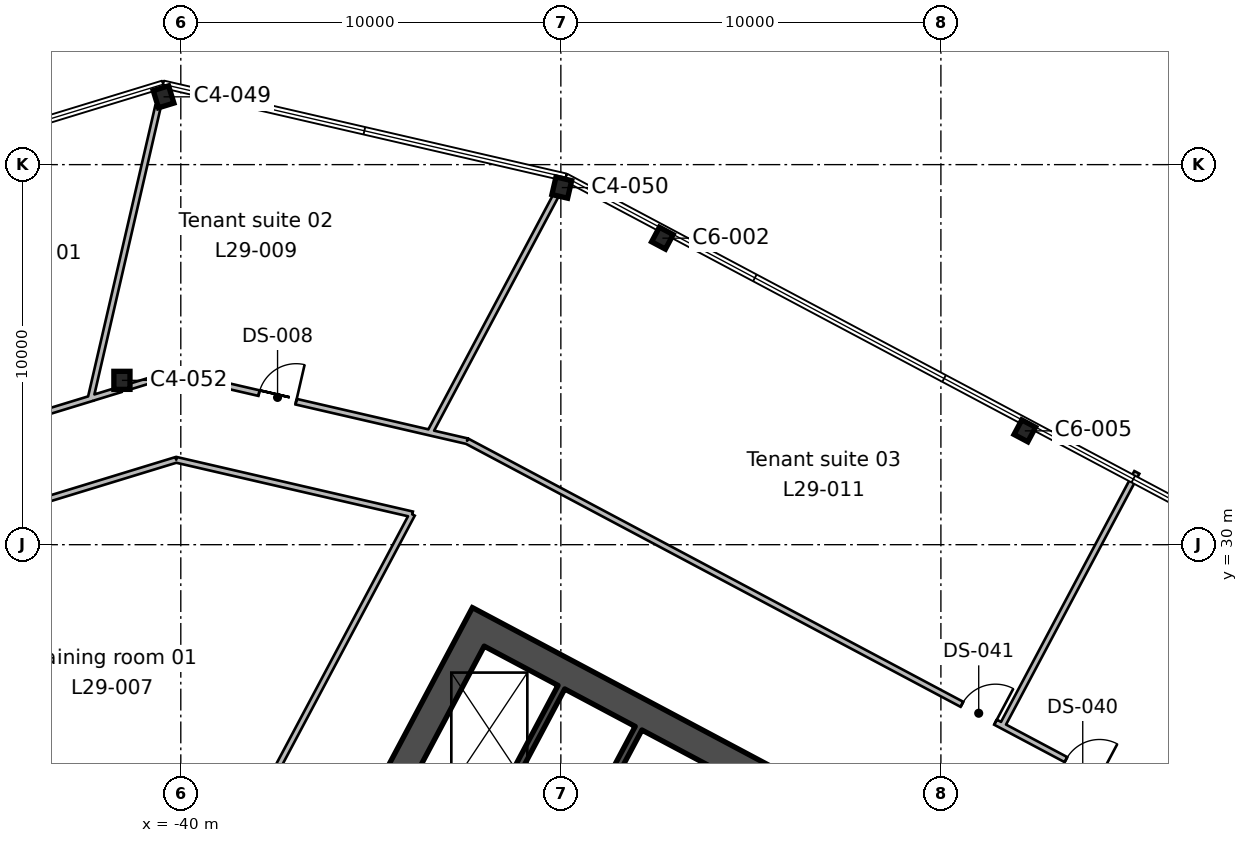
"""IFC4 building model, lengths in metres.
Left out: names, types, materials, properties, quantities, classifications, styles, units other than length and angle.
Written with IfcOpenShell. Run it as: python <this file> out.ifc"""

import sys

from ifc_helpers import new_model, si_unit, direction, frame, frame_2d, origin, origin_2d, place, context, subcontext, project, spatial, rectangle, i_section, extrude, element, fill, save


model = new_model("IFC4")
c1 = context("Model", 3, precision=1e-05, world=origin(), true_north=direction((0.0, 1.0)))
c2 = subcontext(c1, "Body", "Model", "MODEL_VIEW")
j1 = project(units=[si_unit("LENGTHUNIT", "METRE"), si_unit("PLANEANGLEUNIT", "RADIAN")], contexts=[c1])
p1 = place(None, origin())
s1 = spatial("IfcSite", under=j1, at=p1, CompositionType="ELEMENT")
p2 = place(p1, origin())
s2 = spatial("IfcBuilding", under=s1, at=p2, CompositionType="ELEMENT")
p3 = place(p2, frame((0.0, 0.0, 142.2)))
s3 = spatial("IfcBuildingStorey", under=s2, at=p3, CompositionType="ELEMENT", Elevation=142.2)
p4 = place(p3, frame((-17.792, 32.995, 0.0), z_axis=(0.0, 0.0, 1.0), x_axis=(-0.882947592859, 0.469471562786, 0.0)))
e1 = element("IfcColumn", 1, at=p4, inside=s3, PredefinedType="COLUMN", context=c2, shape_type="SweptSolid", body=[
    extrude(i_section(OverallWidth=0.412, OverallDepth=0.434, WebThickness=0.036, FlangeThickness=0.057, FilletRadius=0.015, at=origin_2d()), origin(), (0.0, 0.0, 1.0), 4.0),
])
p5 = place(p3, frame((-41.549, 34.324, 0.0), z_axis=(0.0, 0.0, 1.0), x_axis=(1.0, 0.0, 0.0)))
e2 = element("IfcColumn", 2, at=p5, inside=s3, PredefinedType="COLUMN", context=c2, shape_type="SweptSolid", body=[
    extrude(i_section(OverallWidth=0.424, OverallDepth=0.475, WebThickness=0.048, FlangeThickness=0.077, FilletRadius=0.015, at=origin_2d()), origin(), (0.0, 0.0, 1.0), 4.0),
])
p6 = place(p3, frame((-27.328, 38.065, 0.0), z_axis=(0.0, 0.0, 1.0), x_axis=(-0.882947592859, 0.469471562786, 0.0)))
e3 = element("IfcColumn", 3, at=p6, inside=s3, PredefinedType="COLUMN", context=c2, shape_type="SweptSolid", body=[
    extrude(i_section(OverallWidth=0.412, OverallDepth=0.434, WebThickness=0.036, FlangeThickness=0.057, FilletRadius=0.015, at=origin_2d()), origin(), (0.0, 0.0, 1.0), 4.0),
])
for number, where, z_axis, x_axis in (
    (4, (-29.975, 39.396, 0.0), (0.0, 0.0, 1.0), (-0.974, 0.225, 0.0)),
    (5, (-40.454, 41.784, 0.0), (0.0, 0.0, 1.0), (-0.956, -0.292, 0.0)),
):
    element("IfcColumn", number, at=place(p3, frame(where, z_axis=z_axis, x_axis=x_axis)), inside=s3, PredefinedType="COLUMN", context=c2, shape_type="SweptSolid", body=[
        extrude(i_section(OverallWidth=0.424, OverallDepth=0.475, WebThickness=0.048, FlangeThickness=0.077, FilletRadius=0.015, at=origin_2d()), origin(), (0.0, 0.0, 1.0), 4.0),
    ])
p7 = place(p3, frame((-31.996, 28.168, 0.0), z_axis=(0.0, 0.0, 1.0), x_axis=(-0.469479580143, -0.882943329908, 0.0)))
e6 = element("IfcWall", 6, at=p7, inside=s3, PredefinedType="SHEAR", context=c2, shape_type="SweptSolid", body=[
    extrude(rectangle(XDim=19.7, YDim=0.75, at=frame_2d((9.85, 0.0))), origin(), (0.0, 0.0, 1.0), 4.0),
])
p8 = place(p7, frame((10.45, 0.0, 0.0)))
e7 = element("IfcOpeningElement", 7, at=p8, cuts=e6, PredefinedType="OPENING", context=c2, shape_type="SweptSolid", body=[
    extrude(rectangle(XDim=2.4, YDim=2.4, at=frame_2d((1.2, 1.2))), frame((0.0, 0.385, 0.0), z_axis=(0.0, -1.0, 0.0), x_axis=(1.0, 0.0, 0.0)), (0.0, 0.0, 1.0), 0.77),
])
p9 = place(p3, frame((-14.005, 18.178, 0.0), z_axis=(0.0, 0.0, 1.0), x_axis=(-0.88295010195, 0.469466843842, 0.0)))
e8 = element("IfcWall", 8, at=p9, inside=s3, PredefinedType="SHEAR", context=c2, shape_type="SweptSolid", body=[
    extrude(rectangle(XDim=20.2, YDim=0.75, at=frame_2d((10.1, 0.0))), origin(), (0.0, 0.0, 1.0), 4.0),
])
p10 = place(p3, frame((-27.955, 25.171, 0.0), z_axis=(0.0, 0.0, 1.0), x_axis=(-0.469480409012, -0.88294288918, 0.0)))
e9 = element("IfcWall", 9, at=p10, inside=s3, PredefinedType="SHEAR", context=c2, shape_type="SweptSolid", body=[
    extrude(rectangle(XDim=7.3, YDim=0.2, at=frame_2d((3.65, 0.0))), origin(), (0.0, 0.0, 1.0), 4.0),
])
p11 = place(p3, frame((-29.986, 26.25, 0.0), z_axis=(0.0, 0.0, 1.0), x_axis=(-0.469494272526, -0.882935517501, 0.0)))
e10 = element("IfcWall", 10, at=p11, inside=s3, PredefinedType="SHEAR", context=c2, shape_type="SweptSolid", body=[
    extrude(rectangle(XDim=3.65, YDim=0.2, at=frame_2d((1.825, 0.0))), origin(), (0.0, 0.0, 1.0), 4.0),
])
p12 = place(p3, frame((-42.326, 33.858, 0.0), z_axis=(0.0, 0.0, 1.0), x_axis=(-0.956351168554, -0.292219852858, 0.0)))
e11 = element("IfcWall", 11, at=p12, inside=s3, PredefinedType="PARTITIONING", context=c2, shape_type="SweptSolid", body=[
    extrude(rectangle(XDim=4.709, YDim=0.15, at=frame_2d((2.354, 0.0))), origin(), (0.0, 0.0, 1.0), 3.64),
])
p13 = place(p12, frame((2.025, 0.0, 0.0)))
e12 = element("IfcOpeningElement", 12, at=p13, cuts=e11, PredefinedType="OPENING", context=c2, shape_type="SweptSolid", body=[
    extrude(rectangle(XDim=1.0, YDim=2.1, at=frame_2d((0.5, 1.05))), frame((0.0, 0.085, 0.0), z_axis=(0.0, -1.0, 0.0), x_axis=(1.0, 0.0, 0.0)), (0.0, 0.0, 1.0), 0.17),
])
p14 = place(p3, frame((-45.622, 30.551, 0.0), z_axis=(0.0, 0.0, 1.0), x_axis=(0.956315986812, 0.292334967747, 0.0)))
e13 = element("IfcWall", 13, at=p14, inside=s3, PredefinedType="PARTITIONING", context=c2, shape_type="SweptSolid", body=[
    extrude(rectangle(XDim=5.753, YDim=0.15, at=frame_2d((2.876, 0.0))), origin(), (0.0, 0.0, 1.0), 3.64),
])
p15 = place(p3, frame((-40.12, 32.233, 0.0), z_axis=(0.0, 0.0, 1.0), x_axis=(0.97436665742, -0.224965812754, 0.0)))
e14 = element("IfcWall", 14, at=p15, inside=s3, PredefinedType="PARTITIONING", context=c2, shape_type="SweptSolid", body=[
    extrude(rectangle(XDim=6.374, YDim=0.15, at=frame_2d((3.187, 0.0))), origin(), (0.0, 0.0, 1.0), 3.64),
])
p16 = place(p3, frame((-33.91, 30.799, 0.0), z_axis=(0.0, 0.0, 1.0), x_axis=(-0.469481348016, -0.88294238989, 0.0)))
e15 = element("IfcWall", 15, at=p16, inside=s3, PredefinedType="PARTITIONING", context=c2, shape_type="SweptSolid", body=[
    extrude(rectangle(XDim=22.549, YDim=0.15, at=frame_2d((11.274, 0.0))), origin(), (0.0, 0.0, 1.0), 3.64),
])
p17 = place(p3, frame((-40.599, 41.534, 0.0), z_axis=(0.0, 0.0, 1.0), x_axis=(-0.225013130649, -0.974355731258, 0.0)))
e16 = element("IfcWall", 16, at=p17, inside=s3, PredefinedType="PARTITIONING", context=c2, shape_type="SweptSolid", body=[
    extrude(rectangle(XDim=7.892, YDim=0.15, at=frame_2d((3.946, 0.0))), origin(), (0.0, 0.0, 1.0), 3.64),
])
p18 = place(p3, frame((-34.677, 33.234, 0.0), z_axis=(0.0, 0.0, 1.0), x_axis=(-0.974367234575, 0.224963312978, 0.0)))
e17 = element("IfcWall", 17, at=p18, inside=s3, PredefinedType="PARTITIONING", context=c2, shape_type="SweptSolid", body=[
    extrude(rectangle(XDim=5.668, YDim=0.15, at=frame_2d((2.834, 0.0))), origin(), (0.0, 0.0, 1.0), 3.64),
])
p19 = place(p18, frame((2.35, 0.0, 0.0)))
e18 = element("IfcOpeningElement", 18, at=p19, cuts=e17, PredefinedType="OPENING", context=c2, shape_type="SweptSolid", body=[
    extrude(rectangle(XDim=1.0, YDim=2.1, at=frame_2d((0.5, 1.05))), frame((0.0, 0.085, 0.0), z_axis=(0.0, -1.0, 0.0), x_axis=(1.0, 0.0, 0.0)), (0.0, 0.0, 1.0), 0.17),
])
p20 = place(p3, frame((-40.2, 34.509, 0.0), z_axis=(0.0, 0.0, 1.0), x_axis=(-0.956177669283, -0.29278706386, 0.0)))
e19 = element("IfcWall", 19, at=p20, inside=s3, PredefinedType="PARTITIONING", context=c2, shape_type="SweptSolid", body=[
    extrude(rectangle(XDim=1.189, YDim=0.15, at=frame_2d((0.594, 0.0))), origin(), (0.0, 0.0, 1.0), 3.64),
])
p21 = place(p3, frame((-41.582, 34.087, 0.0), z_axis=(0.0, 0.0, 1.0), x_axis=(-0.956187735772, -0.292754186919, 0.0)))
e20 = element("IfcWall", 20, at=p21, inside=s3, PredefinedType="PARTITIONING", context=c2, shape_type="SweptSolid", body=[
    extrude(rectangle(XDim=0.799, YDim=0.15, at=frame_2d((0.399, 0.0))), origin(), (0.0, 0.0, 1.0), 3.64),
])
p22 = place(p3, frame((-34.677, 33.234, 0.0), z_axis=(0.0, 0.0, 1.0), x_axis=(0.974222435733, -0.22558955143, 0.0)))
e21 = element("IfcWall", 21, at=p22, inside=s3, PredefinedType="PARTITIONING", context=c2, shape_type="SweptSolid", body=[
    extrude(rectangle(XDim=1.294, YDim=0.15, at=frame_2d((0.647, 0.0))), origin(), (0.0, 0.0, 1.0), 3.64),
])
p23 = place(p3, frame((-30.129, 39.188, 0.0), z_axis=(0.0, 0.0, 1.0), x_axis=(-0.469506376509, -0.882929081194, 0.0)))
e22 = element("IfcWall", 22, at=p23, inside=s3, PredefinedType="PARTITIONING", context=c2, shape_type="SweptSolid", body=[
    extrude(rectangle(XDim=7.065, YDim=0.15, at=frame_2d((3.533, 0.0))), origin(), (0.0, 0.0, 1.0), 3.64),
])
p24 = place(p3, frame((-32.47, 32.724, 0.0), z_axis=(0.0, 0.0, 1.0), x_axis=(-0.974513968147, 0.224326828281, 0.0)))
e23 = element("IfcWall", 23, at=p24, inside=s3, PredefinedType="PARTITIONING", context=c2, shape_type="SweptSolid", body=[
    extrude(rectangle(XDim=0.971, YDim=0.15, at=frame_2d((0.485, 0.0))), origin(), (0.0, 0.0, 1.0), 3.64),
])
p25 = place(p3, frame((-32.47, 32.724, 0.0), z_axis=(0.0, 0.0, 1.0), x_axis=(0.88295243426, -0.469462457321, 0.0)))
e24 = element("IfcWall", 24, at=p25, inside=s3, PredefinedType="PARTITIONING", context=c2, shape_type="SweptSolid", body=[
    extrude(rectangle(XDim=36.774, YDim=0.15, at=frame_2d((18.387, 0.0))), origin(), (0.0, 0.0, 1.0), 3.64),
])
p26 = place(p25, frame((17.85, 0.0, 0.0)))
e25 = element("IfcOpeningElement", 25, at=p26, cuts=e24, PredefinedType="OPENING", context=c2, shape_type="SweptSolid", body=[
    extrude(rectangle(XDim=1.0, YDim=2.1, at=frame_2d((0.5, 1.05))), frame((0.0, 0.085, 0.0), z_axis=(0.0, -1.0, 0.0), x_axis=(1.0, 0.0, 0.0)), (0.0, 0.0, 1.0), 0.17),
])
p27 = place(p25, frame((14.75, 0.0, 0.0)))
e26 = element("IfcOpeningElement", 26, at=p27, cuts=e24, PredefinedType="OPENING", context=c2, shape_type="SweptSolid", body=[
    extrude(rectangle(XDim=1.0, YDim=2.1, at=frame_2d((0.5, 1.05))), frame((0.0, 0.085, 0.0), z_axis=(0.0, -1.0, 0.0), x_axis=(1.0, 0.0, 0.0)), (0.0, 0.0, 1.0), 0.17),
])
p28 = place(p3, frame((-14.844, 31.903, 0.0), z_axis=(0.0, 0.0, 1.0), x_axis=(-0.469271860983, -0.883053747226, 0.0)))
e27 = element("IfcWall", 27, at=p28, inside=s3, PredefinedType="PARTITIONING", context=c2, shape_type="SweptSolid", body=[
    extrude(rectangle(XDim=7.55, YDim=0.15, at=frame_2d((3.775, 0.0))), origin(), (0.0, 0.0, 1.0), 3.64),
])
p29 = place(p26, origin())
e28 = element("IfcDoor", 28, at=p29, inside=s3, OperationType="SINGLE_SWING_RIGHT", PredefinedType="DOOR", context=c2, shape_type="SweptSolid", body=[
    extrude(rectangle(XDim=1.0, YDim=2.1, at=frame_2d((0.5, 1.05))), frame((0.0, 0.025, 0.0), z_axis=(0.0, -1.0, 0.0), x_axis=(1.0, 0.0, 0.0)), (0.0, 0.0, 1.0), 0.05),
])
fill(e25, e28)
p30 = place(p27, origin())
e29 = element("IfcDoor", 29, at=p30, inside=s3, OperationType="SINGLE_SWING_RIGHT", PredefinedType="DOOR", context=c2, shape_type="SweptSolid", body=[
    extrude(rectangle(XDim=1.0, YDim=2.1, at=frame_2d((0.5, 1.05))), frame((0.0, 0.025, 0.0), z_axis=(0.0, -1.0, 0.0), x_axis=(1.0, 0.0, 0.0)), (0.0, 0.0, 1.0), 0.05),
])
fill(e26, e29)
p31 = place(p19, frame((1.0, 0.0, 0.0), z_axis=(0.0, 0.0, 1.0), x_axis=(-1.0, 0.0, 0.0)))
e30 = element("IfcDoor", 30, at=p31, inside=s3, OperationType="SINGLE_SWING_RIGHT", PredefinedType="DOOR", context=c2, shape_type="SweptSolid", body=[
    extrude(rectangle(XDim=1.0, YDim=2.1, at=frame_2d((0.5, 1.05))), frame((0.0, 0.025, 0.0), z_axis=(0.0, -1.0, 0.0), x_axis=(1.0, 0.0, 0.0)), (0.0, 0.0, 1.0), 0.05),
])
fill(e18, e30)
save(model, sys.argv[1])
